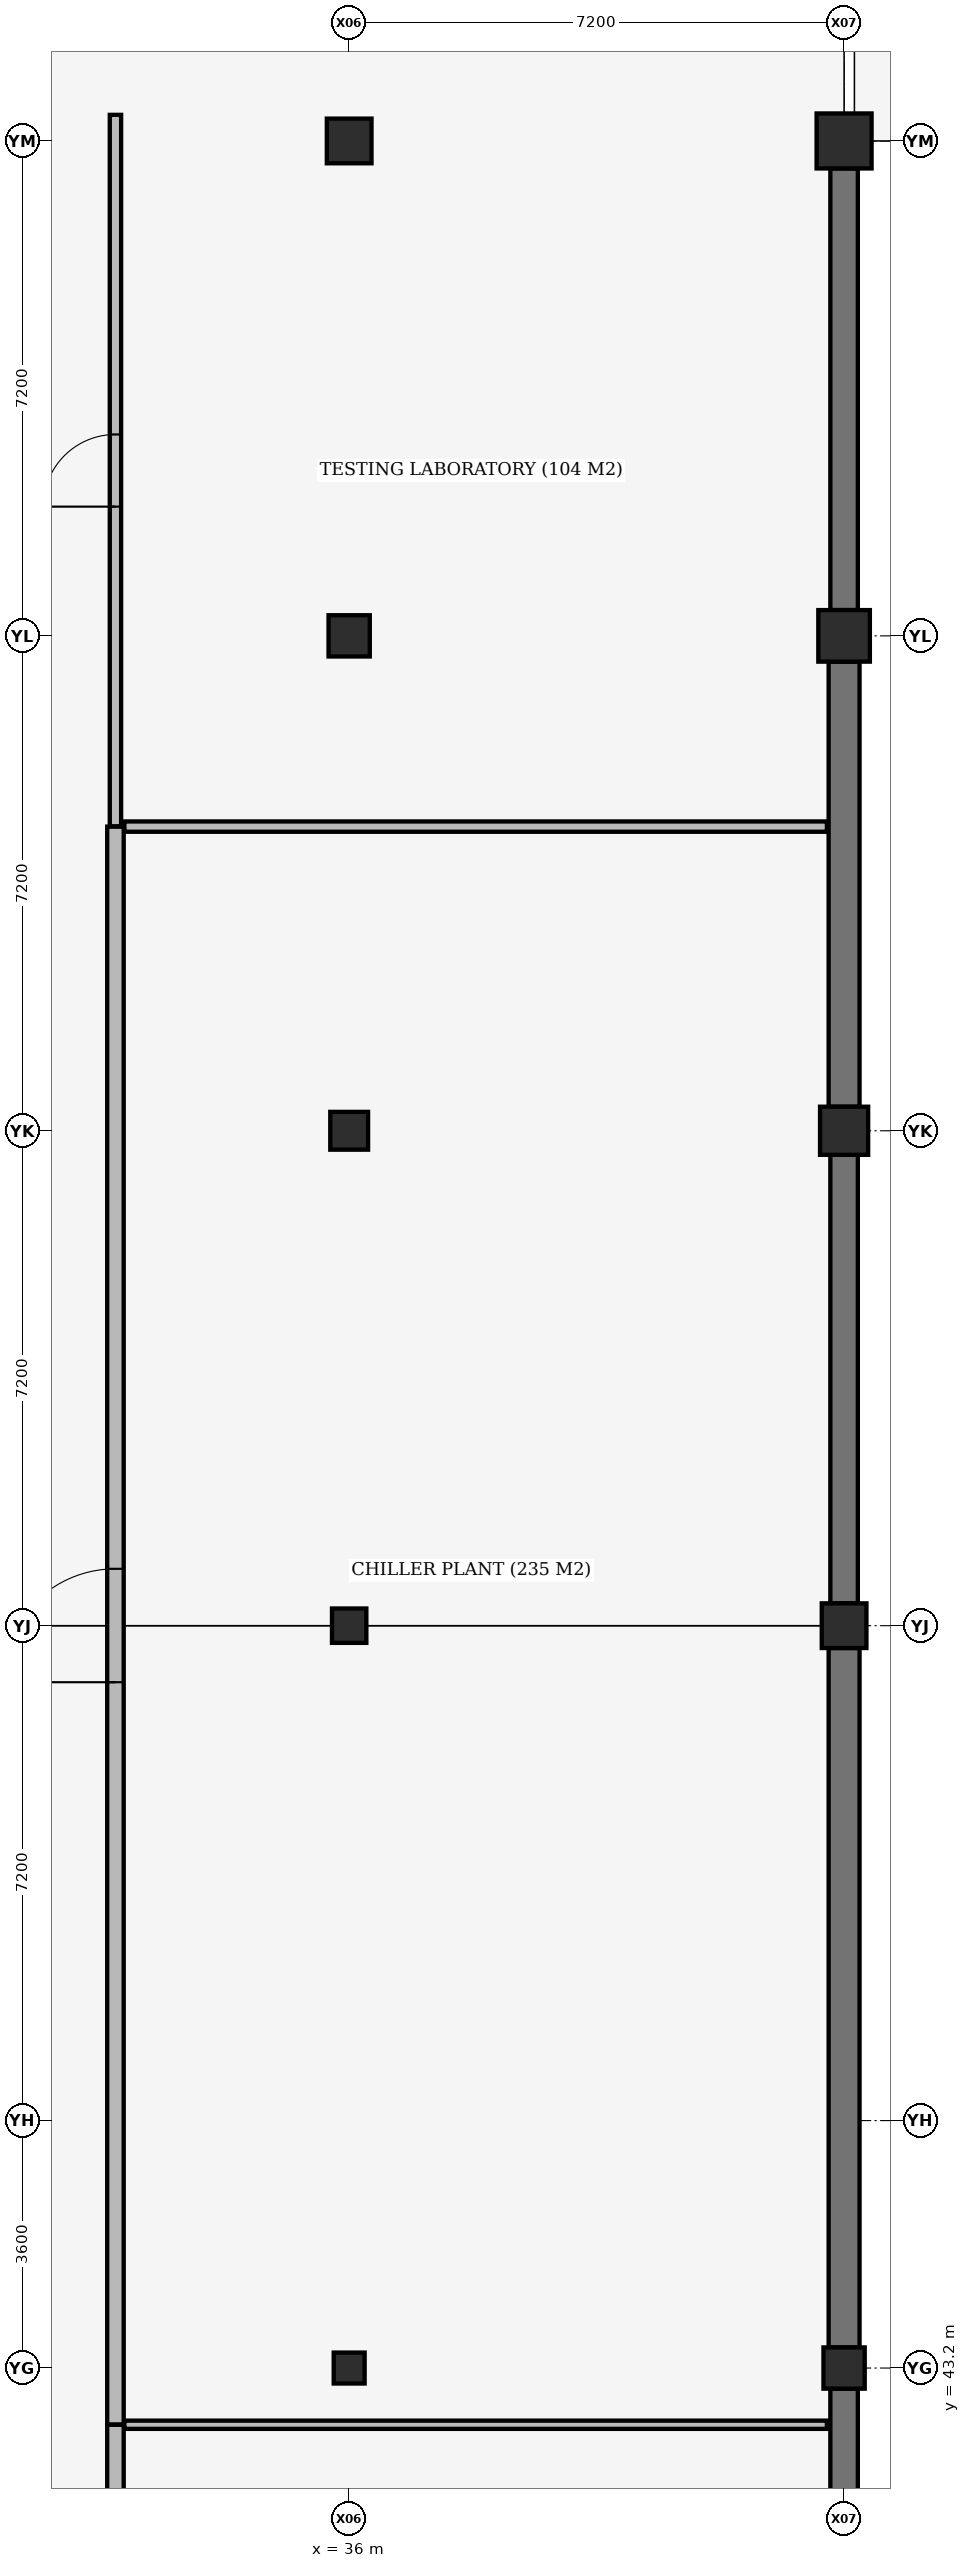
"""IFC4 building model, lengths in metres.
Left out: names, types, materials, properties, quantities, classifications, styles, units other than length and angle.
Written with IfcOpenShell. Run it as: python <this file> out.ifc"""

import sys

from ifc_helpers import new_model, si_unit, direction, frame, frame_2d, origin, origin_2d, place, context, subcontext, project, spatial, rectangle, extrude, element, fill, save


model = new_model("IFC4")
c1 = context("Model", 3, precision=1e-05, world=origin(), true_north=direction((0.0, 1.0)))
c2 = subcontext(c1, "Body", "Model", "MODEL_VIEW")
j1 = project(units=[si_unit("LENGTHUNIT", "METRE"), si_unit("PLANEANGLEUNIT", "RADIAN")], contexts=[c1])
p1 = place(None, origin())
s1 = spatial("IfcSite", under=j1, at=p1, CompositionType="ELEMENT")
p2 = place(p1, origin())
s2 = spatial("IfcBuilding", under=s1, at=p2, CompositionType="ELEMENT")
p3 = place(p2, frame((0.0, 0.0, -4.5)))
s3 = spatial("IfcBuildingStorey", under=s2, at=p3, CompositionType="ELEMENT", Elevation=-4.5)
p4 = place(p3, frame((36.0, 43.2, -0.42), z_axis=(0.0, 0.0, 1.0), x_axis=(1.0, 0.0, 0.0)))
e1 = element("IfcColumn", 1, at=p4, inside=s3, PredefinedType="COLUMN", context=c2, shape_type="SweptSolid", body=[
    extrude(rectangle(XDim=0.45, YDim=0.45, at=origin_2d()), origin(), (0.0, 0.0, 1.0), 4.6),
])
p5 = place(p3, frame((36.0, 54.0, -0.42), z_axis=(0.0, 0.0, 1.0), x_axis=(1.0, 0.0, 0.0)))
e2 = element("IfcColumn", 2, at=p5, inside=s3, PredefinedType="COLUMN", context=c2, shape_type="SweptSolid", body=[
    extrude(rectangle(XDim=0.5, YDim=0.5, at=origin_2d()), origin(), (0.0, 0.0, 1.0), 4.6),
])
p6 = place(p3, frame((36.0, 61.2, -0.42), z_axis=(0.0, 0.0, 1.0), x_axis=(1.0, 0.0, 0.0)))
e3 = element("IfcColumn", 3, at=p6, inside=s3, PredefinedType="COLUMN", context=c2, shape_type="SweptSolid", body=[
    extrude(rectangle(XDim=0.55, YDim=0.55, at=origin_2d()), origin(), (0.0, 0.0, 1.0), 4.6),
])
p7 = place(p3, frame((36.0, 68.4, -0.42), z_axis=(0.0, 0.0, 1.0), x_axis=(1.0, 0.0, 0.0)))
e4 = element("IfcColumn", 4, at=p7, inside=s3, PredefinedType="COLUMN", context=c2, shape_type="SweptSolid", body=[
    extrude(rectangle(XDim=0.6, YDim=0.6, at=origin_2d()), origin(), (0.0, 0.0, 1.0), 4.6),
])
p8 = place(p3, frame((36.0, 75.6, -0.42), z_axis=(0.0, 0.0, 1.0), x_axis=(1.0, 0.0, 0.0)))
e5 = element("IfcColumn", 5, at=p8, inside=s3, PredefinedType="COLUMN", context=c2, shape_type="SweptSolid", body=[
    extrude(rectangle(XDim=0.65, YDim=0.65, at=origin_2d()), origin(), (0.0, 0.0, 1.0), 4.6),
])
p9 = place(p3, frame((43.2, 43.2, -0.42), z_axis=(0.0, 0.0, 1.0), x_axis=(1.0, 0.0, 0.0)))
e6 = element("IfcColumn", 6, at=p9, inside=s3, PredefinedType="COLUMN", context=c2, shape_type="SweptSolid", body=[
    extrude(rectangle(XDim=0.6, YDim=0.6, at=origin_2d()), origin(), (0.0, 0.0, 1.0), 4.6),
])
p10 = place(p3, frame((43.2, 54.0, -0.42), z_axis=(0.0, 0.0, 1.0), x_axis=(1.0, 0.0, 0.0)))
e7 = element("IfcColumn", 7, at=p10, inside=s3, PredefinedType="COLUMN", context=c2, shape_type="SweptSolid", body=[
    extrude(rectangle(XDim=0.65, YDim=0.65, at=origin_2d()), origin(), (0.0, 0.0, 1.0), 4.6),
])
p11 = place(p3, frame((43.2, 61.2, -0.42), z_axis=(0.0, 0.0, 1.0), x_axis=(1.0, 0.0, 0.0)))
e8 = element("IfcColumn", 8, at=p11, inside=s3, PredefinedType="COLUMN", context=c2, shape_type="SweptSolid", body=[
    extrude(rectangle(XDim=0.7, YDim=0.7, at=origin_2d()), origin(), (0.0, 0.0, 1.0), 4.6),
])
p12 = place(p3, frame((43.2, 68.4, -0.42), z_axis=(0.0, 0.0, 1.0), x_axis=(1.0, 0.0, 0.0)))
e9 = element("IfcColumn", 9, at=p12, inside=s3, PredefinedType="COLUMN", context=c2, shape_type="SweptSolid", body=[
    extrude(rectangle(XDim=0.75, YDim=0.75, at=origin_2d()), origin(), (0.0, 0.0, 1.0), 4.6),
])
p13 = place(p3, frame((43.2, 75.6, -0.42), z_axis=(0.0, 0.0, 1.0), x_axis=(1.0, 0.0, 0.0)))
e10 = element("IfcColumn", 10, at=p13, inside=s3, PredefinedType="COLUMN", context=c2, shape_type="SweptSolid", body=[
    extrude(rectangle(XDim=0.8, YDim=0.8, at=origin_2d()), origin(), (0.0, 0.0, 1.0), 4.6),
])
p14 = place(p3, frame((43.2, 36.275, 0.0), z_axis=(0.0, 0.0, 1.0), x_axis=(0.0, 1.0, 0.0)))
e11 = element("IfcWall", 11, at=p14, inside=s3, PredefinedType="USERDEFINED", context=c2, shape_type="SweptSolid", body=[
    extrude(rectangle(XDim=6.625, YDim=0.4, at=frame_2d((3.312, 0.0))), origin(), (0.0, 0.0, 1.0), 4.18),
])
p15 = place(p3, frame((43.2, 43.5, 0.0), z_axis=(0.0, 0.0, 1.0), x_axis=(0.0, 1.0, 0.0)))
e12 = element("IfcWall", 12, at=p15, inside=s3, PredefinedType="USERDEFINED", context=c2, shape_type="SweptSolid", body=[
    extrude(rectangle(XDim=10.175, YDim=0.45, at=frame_2d((5.087, 0.0))), origin(), (0.0, 0.0, 1.0), 4.18),
])
p16 = place(p3, frame((43.2, 54.325, 0.0), z_axis=(0.0, 0.0, 1.0), x_axis=(0.0, 1.0, 0.0)))
e13 = element("IfcWall", 13, at=p16, inside=s3, PredefinedType="USERDEFINED", context=c2, shape_type="SweptSolid", body=[
    extrude(rectangle(XDim=6.525, YDim=0.4, at=frame_2d((3.263, 0.0))), origin(), (0.0, 0.0, 1.0), 4.18),
])
p17 = place(p3, frame((43.2, 61.55, 0.0), z_axis=(0.0, 0.0, 1.0), x_axis=(0.0, 1.0, 0.0)))
e14 = element("IfcWall", 14, at=p17, inside=s3, PredefinedType="USERDEFINED", context=c2, shape_type="SweptSolid", body=[
    extrude(rectangle(XDim=6.475, YDim=0.45, at=frame_2d((3.237, 0.0))), origin(), (0.0, 0.0, 1.0), 4.18),
])
p18 = place(p3, frame((43.2, 68.775, 0.0), z_axis=(0.0, 0.0, 1.0), x_axis=(0.0, 1.0, 0.0)))
e15 = element("IfcWall", 15, at=p18, inside=s3, PredefinedType="USERDEFINED", context=c2, shape_type="SweptSolid", body=[
    extrude(rectangle(XDim=6.425, YDim=0.4, at=frame_2d((3.212, 0.0))), origin(), (0.0, 0.0, 1.0), 4.18),
])
p19 = place(p3, frame((32.6, 28.42, 0.0), z_axis=(0.0, 0.0, 1.0), x_axis=(0.0, 1.0, 0.0)))
e16 = element("IfcWall", 16, at=p19, inside=s3, PredefinedType="STANDARD", context=c2, shape_type="SweptSolid", body=[
    extrude(rectangle(XDim=13.955, YDim=0.24, at=frame_2d((6.978, 0.0))), origin(), (0.0, 0.0, 1.0), 3.38),
])
p20 = place(p19, frame((6.153, 0.0, 0.0)))
e17 = element("IfcOpeningElement", 17, at=p20, cuts=e16, PredefinedType="OPENING", context=c2, shape_type="SweptSolid", body=[
    extrude(rectangle(XDim=1.65, YDim=2.25, at=frame_2d((0.825, 1.125))), frame((0.0, 0.13, 0.0), z_axis=(0.0, -1.0, 0.0), x_axis=(1.0, 0.0, 0.0)), (0.0, 0.0, 1.0), 0.26),
])
p21 = place(p3, frame((32.73, 42.375, 0.0), z_axis=(0.0, 0.0, 1.0), x_axis=(1.0, 0.0, 0.0)))
e18 = element("IfcWall", 18, at=p21, inside=s3, PredefinedType="PARTITIONING", context=c2, shape_type="SweptSolid", body=[
    extrude(rectangle(XDim=10.22, YDim=0.12, at=frame_2d((5.11, 0.0))), origin(), (0.0, 0.0, 1.0), 3.48),
])
p22 = place(p3, frame((32.6, 42.38, 0.0), z_axis=(0.0, 0.0, 1.0), x_axis=(0.0, 1.0, 0.0)))
e19 = element("IfcWall", 19, at=p22, inside=s3, PredefinedType="STANDARD", context=c2, shape_type="SweptSolid", body=[
    extrude(rectangle(XDim=23.245, YDim=0.24, at=frame_2d((11.623, 0.0))), origin(), (0.0, 0.0, 1.0), 3.38),
])
p23 = place(p22, frame((10.798, 0.0, 0.0)))
e20 = element("IfcOpeningElement", 20, at=p23, cuts=e19, PredefinedType="OPENING", context=c2, shape_type="SweptSolid", body=[
    extrude(rectangle(XDim=1.65, YDim=2.25, at=frame_2d((0.825, 1.125))), frame((0.0, 0.13, 0.0), z_axis=(0.0, -1.0, 0.0), x_axis=(1.0, 0.0, 0.0)), (0.0, 0.0, 1.0), 0.26),
])
p24 = place(p3, frame((32.73, 65.625, 0.0), z_axis=(0.0, 0.0, 1.0), x_axis=(1.0, 0.0, 0.0)))
e21 = element("IfcWall", 21, at=p24, inside=s3, PredefinedType="PARTITIONING", context=c2, shape_type="SweptSolid", body=[
    extrude(rectangle(XDim=10.22, YDim=0.15, at=frame_2d((5.11, 0.0))), origin(), (0.0, 0.0, 1.0), 3.58),
])
p25 = place(p3, frame((32.6, 65.63, 0.0), z_axis=(0.0, 0.0, 1.0), x_axis=(0.0, 1.0, 0.0)))
e22 = element("IfcWall", 22, at=p25, inside=s3, PredefinedType="PARTITIONING", context=c2, shape_type="SweptSolid", body=[
    extrude(rectangle(XDim=10.35, YDim=0.165, at=frame_2d((5.175, 0.0))), origin(), (0.0, 0.0, 1.0), 3.38),
])
p26 = place(p25, frame((4.65, 0.0, 0.0)))
e23 = element("IfcOpeningElement", 23, at=p26, cuts=e22, PredefinedType="OPENING", context=c2, shape_type="SweptSolid", body=[
    extrude(rectangle(XDim=1.05, YDim=2.2, at=frame_2d((0.525, 1.1))), frame((0.0, 0.093, 0.0), z_axis=(0.0, -1.0, 0.0), x_axis=(1.0, 0.0, 0.0)), (0.0, 0.0, 1.0), 0.185),
])
p27 = place(p23, origin())
e24 = element("IfcDoor", 24, at=p27, inside=s3, OperationType="DOUBLE_DOOR_SINGLE_SWING", PredefinedType="DOOR", context=c2, shape_type="SweptSolid", body=[
    extrude(rectangle(XDim=1.65, YDim=2.25, at=frame_2d((0.825, 1.125))), frame((0.0, 0.025, 0.0), z_axis=(0.0, -1.0, 0.0), x_axis=(1.0, 0.0, 0.0)), (0.0, 0.0, 1.0), 0.05),
])
fill(e20, e24)
p28 = place(p26, origin())
e25 = element("IfcDoor", 25, at=p28, inside=s3, OperationType="SINGLE_SWING_LEFT", PredefinedType="DOOR", context=c2, shape_type="SweptSolid", body=[
    extrude(rectangle(XDim=1.05, YDim=2.2, at=frame_2d((0.525, 1.1))), frame((0.0, 0.025, 0.0), z_axis=(0.0, -1.0, 0.0), x_axis=(1.0, 0.0, 0.0)), (0.0, 0.0, 1.0), 0.05),
])
fill(e23, e25)
save(model, sys.argv[1])
